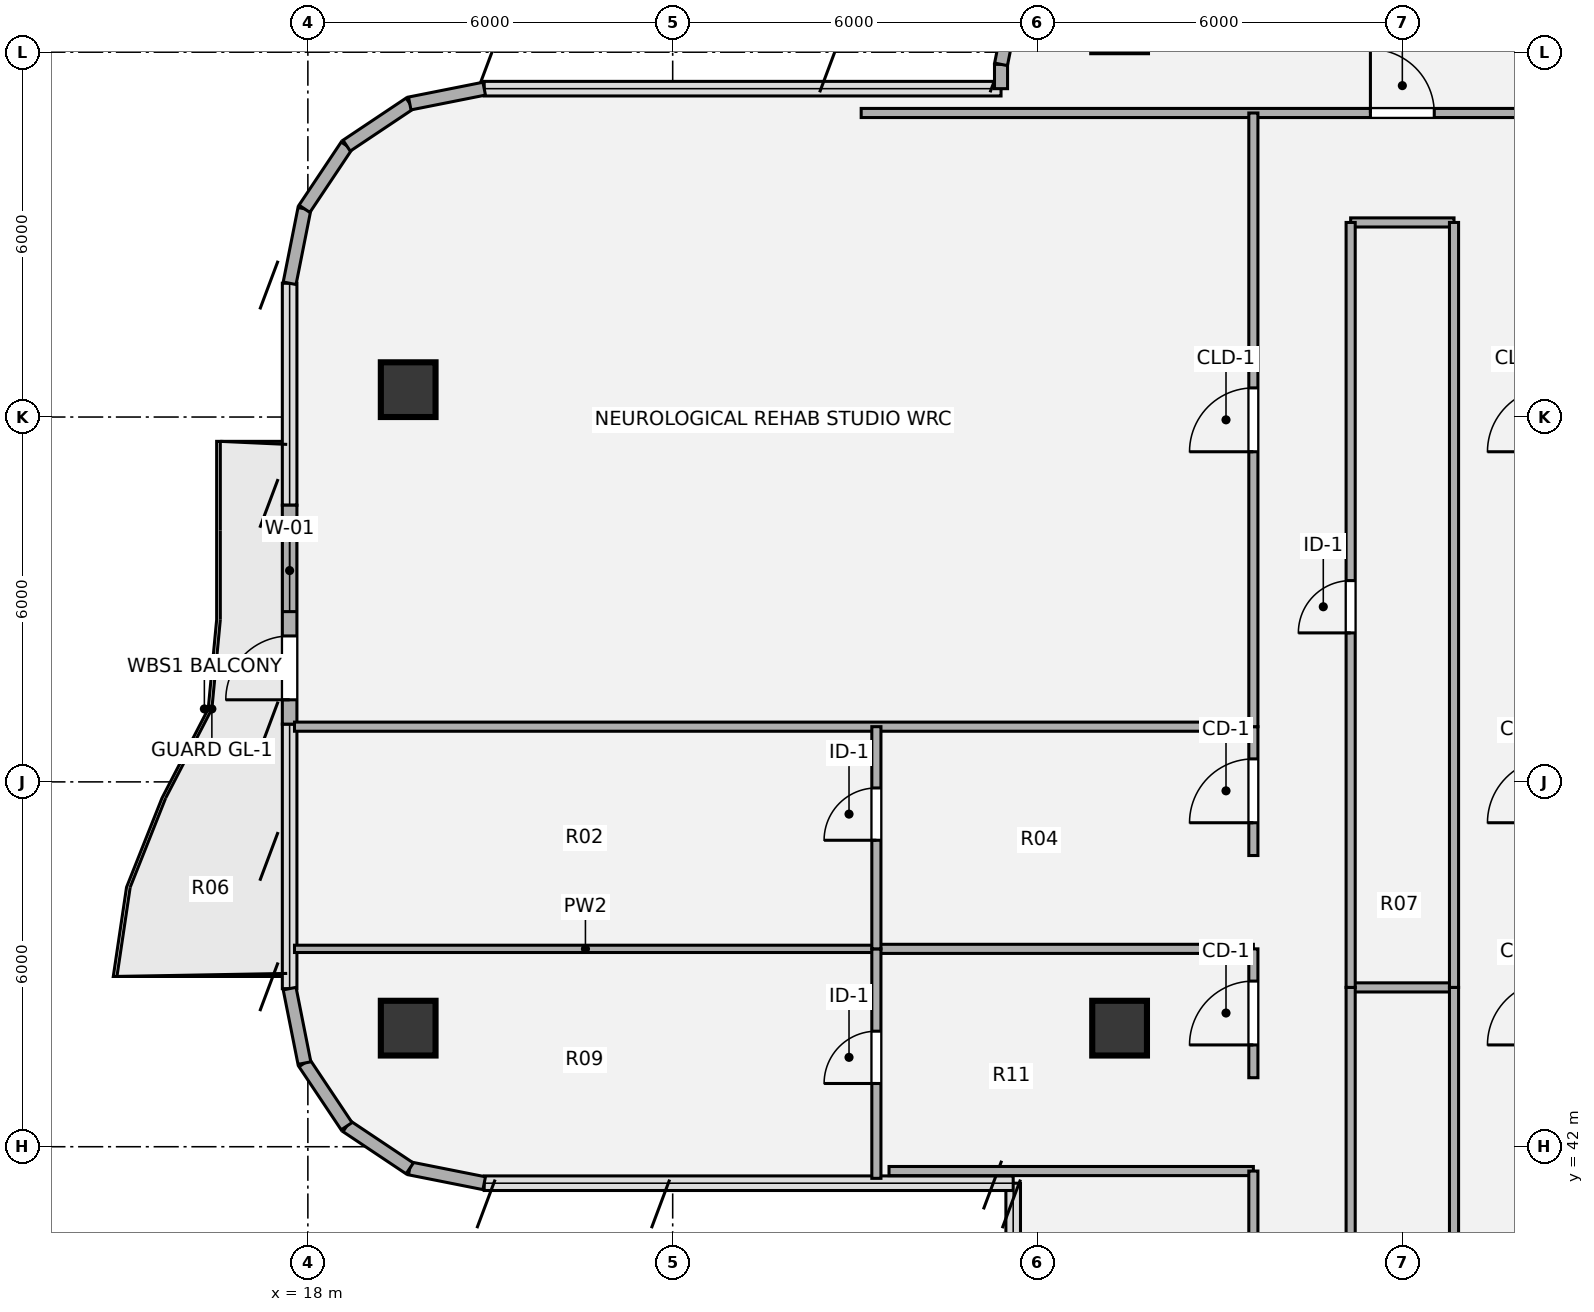
"""IFC4 building model, lengths in metres.
Left out: names, types, materials, properties, quantities, classifications, styles, units other than length and angle.
Written with IfcOpenShell. Run it as: python <this file> out.ifc"""

import sys

from ifc_helpers import new_model, si_unit, direction, frame, frame_2d, origin, origin_2d, place, context, subcontext, project, spatial, rectangle, hollow_circle, extrude, source, transform, mapped, element, fill, save


model = new_model("IFC4")
c1 = context("Model", 3, precision=1e-05, world=origin(), true_north=direction((0.0, 1.0)))
c2 = subcontext(c1, "Body", "Model", "MODEL_VIEW")
j1 = project(units=[si_unit("LENGTHUNIT", "METRE"), si_unit("PLANEANGLEUNIT", "RADIAN")], contexts=[c1])
p1 = place(None, origin())
s1 = spatial("IfcSite", under=j1, at=p1, CompositionType="ELEMENT")
p2 = place(p1, origin())
s2 = spatial("IfcBuilding", under=s1, at=p2, CompositionType="ELEMENT")
p3 = place(p2, frame((0.0, 0.0, 245.7)))
s3 = spatial("IfcBuildingStorey", under=s2, at=p3, CompositionType="ELEMENT", Elevation=245.7)
m1 = source(origin(), c2, "Body", "SweptSolid", [
    extrude(hollow_circle(Radius=0.45, WallThickness=0.032, at=origin_2d()), origin(), (0.0, 0.0, 1.0), 3.78),
])
for number, where, z_axis, x_axis in (
    (1, (19.65, 43.95, 0.0), (0.0, 0.0, 1.0), (1.0, 0.0, 0.0)),
    (2, (19.65, 54.45, 0.0), (0.0, 0.0, 1.0), (1.0, 0.0, 0.0)),
    (3, (31.35, 43.95, 0.0), (0.0, 0.0, 1.0), (1.0, 0.0, 0.0)),
):
    element("IfcColumn", number, at=place(p3, frame(where, z_axis=z_axis, x_axis=x_axis)), inside=s3, PredefinedType="COLUMN", context=c2, shape_type="MappedRepresentation", body=[
        mapped(m1, transform((0.0, 0.0, 0.0), x_axis=(1.0, 0.0, 0.0), y_axis=(0.0, 1.0, 0.0), z_axis=(0.0, 0.0, 1.0), scale=1.0)),
    ])
for number, where, z_axis, x_axis in (
    (4, (20.9, 41.4, 0.0), (0.0, 0.0, 1.0), (-0.981, 0.195, 0.0)),
    (5, (19.675, 41.644, 0.0), (0.0, 0.0, 1.0), (-0.831, 0.556, 0.0)),
    (6, (18.637, 42.337, 0.0), (0.0, 0.0, 1.0), (-0.556, 0.831, 0.0)),
    (7, (17.944, 43.375, 0.0), (0.0, 0.0, 1.0), (-0.195, 0.981, 0.0)),
):
    element("IfcWall", number, at=place(p3, frame(where, z_axis=z_axis, x_axis=x_axis)), inside=s3, PredefinedType="SOLIDWALL", context=c2, shape_type="SweptSolid", body=[
        extrude(rectangle(XDim=1.249, YDim=0.215, at=frame_2d((0.624, 0.0))), origin(), (0.0, 0.0, 1.0), 3.53),
    ])
p4 = place(p3, frame((17.7, 48.95, 0.0), z_axis=(0.0, 0.0, 1.0), x_axis=(0.0, 1.0, 0.0)))
e8 = element("IfcWall", 8, at=p4, inside=s3, PredefinedType="SOLIDWALL", context=c2, shape_type="SweptSolid", body=[
    extrude(rectangle(XDim=3.6, YDim=0.24, at=frame_2d((1.8, 0.0))), origin(), (0.0, 0.0, 1.0), 3.53),
])
p5 = place(p4, frame((0.4, 0.0, 0.0)))
e9 = element("IfcOpeningElement", 9, at=p5, cuts=e8, PredefinedType="OPENING", context=c2, shape_type="SweptSolid", body=[
    extrude(rectangle(XDim=1.05, YDim=2.15, at=origin_2d()), frame((0.525, 0.13, 1.075), z_axis=(0.0, -1.0, 0.0), x_axis=(1.0, 0.0, 0.0)), (0.0, 0.0, 1.0), 0.26),
])
p6 = place(p4, frame((1.85, 0.0, 0.85)))
e10 = element("IfcOpeningElement", 10, at=p6, cuts=e8, PredefinedType="OPENING", context=c2, shape_type="SweptSolid", body=[
    extrude(rectangle(XDim=1.35, YDim=1.35, at=origin_2d()), frame((0.675, 0.13, 0.675), z_axis=(0.0, -1.0, 0.0), x_axis=(1.0, 0.0, 0.0)), (0.0, 0.0, 1.0), 0.26),
])
for number, where, z_axis, x_axis in (
    (11, (17.7, 56.2, 0.0), (0.0, 0.0, 1.0), (0.195, 0.981, 0.0)),
    (12, (17.944, 57.425, 0.0), (0.0, 0.0, 1.0), (0.556, 0.831, 0.0)),
    (13, (18.637, 58.463, 0.0), (0.0, 0.0, 1.0), (0.831, 0.556, 0.0)),
    (14, (19.675, 59.156, 0.0), (0.0, 0.0, 1.0), (0.981, 0.195, 0.0)),
):
    element("IfcWall", number, at=place(p3, frame(where, z_axis=z_axis, x_axis=x_axis)), inside=s3, PredefinedType="SOLIDWALL", context=c2, shape_type="SweptSolid", body=[
        extrude(rectangle(XDim=1.249, YDim=0.215, at=frame_2d((0.624, 0.0))), origin(), (0.0, 0.0, 1.0), 3.53),
    ])
p7 = place(p3, frame((29.4, 59.4, 0.0), z_axis=(0.0, 0.0, 1.0), x_axis=(0.0, 1.0, 0.0)))
e15 = element("IfcWall", 15, at=p7, inside=s3, PredefinedType="SOLIDWALL", context=c2, shape_type="SweptSolid", body=[
    extrude(rectangle(XDim=0.4, YDim=0.215, at=frame_2d((0.2, 0.0))), origin(), (0.0, 0.0, 1.0), 3.53),
])
p8 = place(p3, frame((29.4, 59.8, 0.0), z_axis=(0.0, 0.0, 1.0), x_axis=(0.195190360752, 0.980765376158, 0.0)))
e16 = element("IfcWall", 16, at=p8, inside=s3, PredefinedType="SOLIDWALL", context=c2, shape_type="SweptSolid", body=[
    extrude(rectangle(XDim=1.014, YDim=0.215, at=frame_2d((0.507, 0.0))), origin(), (0.0, 0.0, 1.0), 3.53),
])
p9 = place(p3, frame((27.558, 41.6, 0.0), z_axis=(0.0, 0.0, 1.0), x_axis=(1.0, 0.0, 0.0)))
e17 = element("IfcWall", 17, at=p9, inside=s3, PredefinedType="PARTITIONING", context=c2, shape_type="SweptSolid", body=[
    extrude(rectangle(XDim=5.992, YDim=0.15, at=frame_2d((2.996, 0.0))), origin(), (0.0, 0.0, 1.0), 3.5),
])
p10 = place(p3, frame((35.15, 44.62, 0.0), z_axis=(0.0, 0.0, 1.0), x_axis=(1.0, 0.0, 0.0)))
e18 = element("IfcWall", 18, at=p10, inside=s3, PredefinedType="PARTITIONING", context=c2, shape_type="SweptSolid", body=[
    extrude(rectangle(XDim=1.7, YDim=0.15, at=frame_2d((0.85, 0.0))), origin(), (0.0, 0.0, 1.0), 3.259),
])
p11 = place(p3, frame((17.78, 45.254, 0.0), z_axis=(0.0, 0.0, 1.0), x_axis=(1.0, 0.0, 0.0)))
e19 = element("IfcWall", 19, at=p11, inside=s3, PredefinedType="PARTITIONING", context=c2, shape_type="SweptSolid", body=[
    extrude(rectangle(XDim=9.57, YDim=0.12, at=frame_2d((4.785, 0.0))), origin(), (0.0, 0.0, 1.0), 2.982),
])
p12 = place(p3, frame((27.35, 45.254, 0.0), z_axis=(0.0, 0.0, 1.0), x_axis=(1.0, 0.0, 0.0)))
e20 = element("IfcWall", 20, at=p12, inside=s3, PredefinedType="PARTITIONING", context=c2, shape_type="SweptSolid", body=[
    extrude(rectangle(XDim=6.2, YDim=0.15, at=frame_2d((3.1, 0.0))), origin(), (0.0, 0.0, 1.0), 2.982),
])
p13 = place(p3, frame((17.78, 48.908, 0.0), z_axis=(0.0, 0.0, 1.0), x_axis=(1.0, 0.0, 0.0)))
e21 = element("IfcWall", 21, at=p13, inside=s3, PredefinedType="PARTITIONING", context=c2, shape_type="SweptSolid", body=[
    extrude(rectangle(XDim=15.77, YDim=0.15, at=frame_2d((7.885, 0.0))), origin(), (0.0, 0.0, 1.0), 2.982),
])
p14 = place(p3, frame((35.15, 57.2, 0.0), z_axis=(0.0, 0.0, 1.0), x_axis=(1.0, 0.0, 0.0)))
e22 = element("IfcWall", 22, at=p14, inside=s3, PredefinedType="PARTITIONING", context=c2, shape_type="SweptSolid", body=[
    extrude(rectangle(XDim=1.7, YDim=0.15, at=frame_2d((0.85, 0.0))), origin(), (0.0, 0.0, 1.0), 3.308),
])
p15 = place(p3, frame((27.1, 59.0, 0.0), z_axis=(0.0, 0.0, 1.0), x_axis=(1.0, 0.0, 0.0)))
e23 = element("IfcWall", 23, at=p15, inside=s3, PredefinedType="PARTITIONING", context=c2, shape_type="SweptSolid", body=[
    extrude(rectangle(XDim=17.8, YDim=0.15, at=frame_2d((8.9, 0.0))), origin(), (0.0, 0.0, 1.0), 3.308),
])
p16 = place(p15, frame((8.375, 0.0, 0.0)))
e24 = element("IfcOpeningElement", 24, at=p16, cuts=e23, PredefinedType="OPENING", context=c2, shape_type="SweptSolid", body=[
    extrude(rectangle(XDim=1.05, YDim=2.1, at=origin_2d()), frame((0.525, 0.085, 1.05), z_axis=(0.0, -1.0, 0.0), x_axis=(1.0, 0.0, 0.0)), (0.0, 0.0, 1.0), 0.17),
])
p17 = place(p3, frame((27.35, 41.48, 0.0), z_axis=(0.0, 0.0, 1.0), x_axis=(0.0, 1.0, 0.0)))
e25 = element("IfcWall", 25, at=p17, inside=s3, PredefinedType="PARTITIONING", context=c2, shape_type="SweptSolid", body=[
    extrude(rectangle(XDim=3.774, YDim=0.15, at=frame_2d((1.887, 0.0))), origin(), (0.0, 0.0, 1.0), 3.5),
])
p18 = place(p17, frame((1.56, 0.0, 0.0)))
e26 = element("IfcOpeningElement", 26, at=p18, cuts=e25, PredefinedType="OPENING", context=c2, shape_type="SweptSolid", body=[
    extrude(rectangle(XDim=0.86, YDim=2.1, at=origin_2d()), frame((0.43, 0.085, 1.05), z_axis=(0.0, -1.0, 0.0), x_axis=(1.0, 0.0, 0.0)), (0.0, 0.0, 1.0), 0.17),
])
p19 = place(p3, frame((27.35, 45.254, 0.0), z_axis=(0.0, 0.0, 1.0), x_axis=(0.0, 1.0, 0.0)))
e27 = element("IfcWall", 27, at=p19, inside=s3, PredefinedType="PARTITIONING", context=c2, shape_type="SweptSolid", body=[
    extrude(rectangle(XDim=3.654, YDim=0.15, at=frame_2d((1.827, 0.0))), origin(), (0.0, 0.0, 1.0), 3.5),
])
p20 = place(p19, frame((1.786, 0.0, 0.0)))
e28 = element("IfcOpeningElement", 28, at=p20, cuts=e27, PredefinedType="OPENING", context=c2, shape_type="SweptSolid", body=[
    extrude(rectangle(XDim=0.86, YDim=2.1, at=origin_2d()), frame((0.43, 0.085, 1.05), z_axis=(0.0, -1.0, 0.0), x_axis=(1.0, 0.0, 0.0)), (0.0, 0.0, 1.0), 0.17),
])
p21 = place(p3, frame((33.55, 21.2, 0.0), z_axis=(0.0, 0.0, 1.0), x_axis=(0.0, 1.0, 0.0)))
e29 = element("IfcWall", 29, at=p21, inside=s3, PredefinedType="PARTITIONING", context=c2, shape_type="SweptSolid", body=[
    extrude(rectangle(XDim=20.4, YDim=0.15, at=frame_2d((10.2, 0.0))), origin(), (0.0, 0.0, 1.0), 3.5),
])
p22 = place(p21, frame((9.64, 0.0, 0.0)))
e30 = element("IfcOpeningElement", 30, at=p22, cuts=e29, PredefinedType="OPENING", context=c2, shape_type="SweptSolid", body=[
    extrude(rectangle(XDim=0.86, YDim=2.1, at=origin_2d()), frame((0.43, 0.085, 1.05), z_axis=(0.0, -1.0, 0.0), x_axis=(1.0, 0.0, 0.0)), (0.0, 0.0, 1.0), 0.17),
])
p23 = place(p3, frame((33.55, 43.135, 0.0), z_axis=(0.0, 0.0, 1.0), x_axis=(0.0, 1.0, 0.0)))
e31 = element("IfcWall", 31, at=p23, inside=s3, PredefinedType="PARTITIONING", context=c2, shape_type="SweptSolid", body=[
    extrude(rectangle(XDim=2.119, YDim=0.15, at=frame_2d((1.06, 0.0))), origin(), (0.0, 0.0, 1.0), 3.5),
])
p24 = place(p23, frame((0.539, 0.0, 0.0)))
e32 = element("IfcOpeningElement", 32, at=p24, cuts=e31, PredefinedType="OPENING", context=c2, shape_type="SweptSolid", body=[
    extrude(rectangle(XDim=1.05, YDim=2.1, at=origin_2d()), frame((0.525, 0.085, 1.05), z_axis=(0.0, -1.0, 0.0), x_axis=(1.0, 0.0, 0.0)), (0.0, 0.0, 1.0), 0.17),
])
p25 = place(p3, frame((33.55, 46.789, 0.0), z_axis=(0.0, 0.0, 1.0), x_axis=(0.0, 1.0, 0.0)))
e33 = element("IfcWall", 33, at=p25, inside=s3, PredefinedType="PARTITIONING", context=c2, shape_type="SweptSolid", body=[
    extrude(rectangle(XDim=2.119, YDim=0.15, at=frame_2d((1.06, 0.0))), origin(), (0.0, 0.0, 1.0), 3.5),
])
p26 = place(p25, frame((0.539, 0.0, 0.0)))
e34 = element("IfcOpeningElement", 34, at=p26, cuts=e33, PredefinedType="OPENING", context=c2, shape_type="SweptSolid", body=[
    extrude(rectangle(XDim=1.05, YDim=2.1, at=origin_2d()), frame((0.525, 0.085, 1.05), z_axis=(0.0, -1.0, 0.0), x_axis=(1.0, 0.0, 0.0)), (0.0, 0.0, 1.0), 0.17),
])
p27 = place(p3, frame((33.55, 48.908, 0.0), z_axis=(0.0, 0.0, 1.0), x_axis=(0.0, 1.0, 0.0)))
e35 = element("IfcWall", 35, at=p27, inside=s3, PredefinedType="PARTITIONING", context=c2, shape_type="SweptSolid", body=[
    extrude(rectangle(XDim=10.092, YDim=0.15, at=frame_2d((5.046, 0.0))), origin(), (0.0, 0.0, 1.0), 3.5),
])
p28 = place(p27, frame((4.521, 0.0, 0.0)))
e36 = element("IfcOpeningElement", 36, at=p28, cuts=e35, PredefinedType="OPENING", context=c2, shape_type="SweptSolid", body=[
    extrude(rectangle(XDim=1.05, YDim=2.1, at=origin_2d()), frame((0.525, 0.085, 1.05), z_axis=(0.0, -1.0, 0.0), x_axis=(1.0, 0.0, 0.0)), (0.0, 0.0, 1.0), 0.17),
])
p29 = place(p3, frame((35.15, 25.2, 0.0), z_axis=(0.0, 0.0, 1.0), x_axis=(0.0, 1.0, 0.0)))
e37 = element("IfcWall", 37, at=p29, inside=s3, PredefinedType="PARTITIONING", context=c2, shape_type="SweptSolid", body=[
    extrude(rectangle(XDim=19.42, YDim=0.15, at=frame_2d((9.71, 0.0))), origin(), (0.0, 0.0, 1.0), 3.5),
])
p30 = place(p3, frame((35.15, 44.62, 0.0), z_axis=(0.0, 0.0, 1.0), x_axis=(0.0, 1.0, 0.0)))
e38 = element("IfcWall", 38, at=p30, inside=s3, PredefinedType="PARTITIONING", context=c2, shape_type="SweptSolid", body=[
    extrude(rectangle(XDim=12.58, YDim=0.15, at=frame_2d((6.29, 0.0))), origin(), (0.0, 0.0, 1.0), 3.5),
])
p31 = place(p30, frame((5.83, 0.0, 0.0)))
e39 = element("IfcOpeningElement", 39, at=p31, cuts=e38, PredefinedType="OPENING", context=c2, shape_type="SweptSolid", body=[
    extrude(rectangle(XDim=0.86, YDim=2.1, at=origin_2d()), frame((0.43, 0.085, 1.05), z_axis=(0.0, -1.0, 0.0), x_axis=(1.0, 0.0, 0.0)), (0.0, 0.0, 1.0), 0.17),
])
p32 = place(p3, frame((36.85, 25.2, 0.0), z_axis=(0.0, 0.0, 1.0), x_axis=(0.0, 1.0, 0.0)))
e40 = element("IfcWall", 40, at=p32, inside=s3, PredefinedType="PARTITIONING", context=c2, shape_type="SweptSolid", body=[
    extrude(rectangle(XDim=19.42, YDim=0.15, at=frame_2d((9.71, 0.0))), origin(), (0.0, 0.0, 1.0), 3.5),
])
p33 = place(p32, frame((9.185, 0.0, 0.0)))
e41 = element("IfcOpeningElement", 41, at=p33, cuts=e40, PredefinedType="OPENING", context=c2, shape_type="SweptSolid", body=[
    extrude(rectangle(XDim=1.05, YDim=2.1, at=origin_2d()), frame((0.525, 0.085, 1.05), z_axis=(0.0, -1.0, 0.0), x_axis=(1.0, 0.0, 0.0)), (0.0, 0.0, 1.0), 0.17),
])
p34 = place(p3, frame((36.85, 44.62, 0.0), z_axis=(0.0, 0.0, 1.0), x_axis=(0.0, 1.0, 0.0)))
e42 = element("IfcWall", 42, at=p34, inside=s3, PredefinedType="PARTITIONING", context=c2, shape_type="SweptSolid", body=[
    extrude(rectangle(XDim=12.58, YDim=0.15, at=frame_2d((6.29, 0.0))), origin(), (0.0, 0.0, 1.0), 3.5),
])
m2 = source(origin(), c2, "Body", "SweptSolid", [
    extrude(rectangle(XDim=1.05, YDim=2.15, at=origin_2d()), frame((0.525, 0.025, 1.075), z_axis=(0.0, -1.0, 0.0), x_axis=(1.0, 0.0, 0.0)), (0.0, 0.0, 1.0), 0.05),
])
p35 = place(p5, origin())
e43 = element("IfcDoor", 43, at=p35, inside=s3, OperationType="SINGLE_SWING_LEFT", PredefinedType="DOOR", context=c2, shape_type="MappedRepresentation", body=[
    mapped(m2, transform((0.0, 0.0, 0.0), x_axis=(1.0, 0.0, 0.0), y_axis=(0.0, 1.0, 0.0), z_axis=(0.0, 0.0, 1.0), scale=1.0)),
])
fill(e9, e43)
m3 = source(origin(), c2, "Body", "SweptSolid", [
    extrude(rectangle(XDim=1.35, YDim=1.35, at=origin_2d()), frame((0.675, 0.03, 0.675), z_axis=(0.0, -1.0, 0.0), x_axis=(1.0, 0.0, 0.0)), (0.0, 0.0, 1.0), 0.06),
])
p36 = place(p6, origin())
e44 = element("IfcWindow", 44, at=p36, inside=s3, PartitioningType="SINGLE_PANEL", PredefinedType="WINDOW", context=c2, shape_type="MappedRepresentation", body=[
    mapped(m3, transform((0.0, 0.0, 0.0), x_axis=(1.0, 0.0, 0.0), y_axis=(0.0, 1.0, 0.0), z_axis=(0.0, 0.0, 1.0), scale=1.0)),
])
fill(e10, e44)
m4 = source(origin(), c2, "Body", "SweptSolid", [
    extrude(rectangle(XDim=1.05, YDim=2.1, at=origin_2d()), frame((0.525, 0.025, 1.05), z_axis=(0.0, -1.0, 0.0), x_axis=(1.0, 0.0, 0.0)), (0.0, 0.0, 1.0), 0.05),
])
p37 = place(p16, origin())
e45 = element("IfcDoor", 45, at=p37, inside=s3, OperationType="SINGLE_SWING_LEFT", PredefinedType="DOOR", context=c2, shape_type="MappedRepresentation", body=[
    mapped(m4, transform((0.0, 0.0, 0.0), x_axis=(1.0, 0.0, 0.0), y_axis=(0.0, 1.0, 0.0), z_axis=(0.0, 0.0, 1.0), scale=1.0)),
])
fill(e24, e45)
m5 = source(origin(), c2, "Body", "SweptSolid", [
    extrude(rectangle(XDim=0.86, YDim=2.1, at=origin_2d()), frame((0.43, 0.025, 1.05), z_axis=(0.0, -1.0, 0.0), x_axis=(1.0, 0.0, 0.0)), (0.0, 0.0, 1.0), 0.05),
])
p38 = place(p18, origin())
e46 = element("IfcDoor", 46, at=p38, inside=s3, OperationType="SINGLE_SWING_LEFT", PredefinedType="DOOR", context=c2, shape_type="MappedRepresentation", body=[
    mapped(m5, transform((0.0, 0.0, 0.0), x_axis=(1.0, 0.0, 0.0), y_axis=(0.0, 1.0, 0.0), z_axis=(0.0, 0.0, 1.0), scale=1.0)),
])
fill(e26, e46)
p39 = place(p20, origin())
e47 = element("IfcDoor", 47, at=p39, inside=s3, OperationType="SINGLE_SWING_LEFT", PredefinedType="DOOR", context=c2, shape_type="MappedRepresentation", body=[
    mapped(m5, transform((0.0, 0.0, 0.0), x_axis=(1.0, 0.0, 0.0), y_axis=(0.0, 1.0, 0.0), z_axis=(0.0, 0.0, 1.0), scale=1.0)),
])
fill(e28, e47)
m6 = source(origin(), c2, "Body", "SweptSolid", [
    extrude(rectangle(XDim=1.05, YDim=2.1, at=origin_2d()), frame((0.525, 0.025, 1.05), z_axis=(0.0, -1.0, 0.0), x_axis=(1.0, 0.0, 0.0)), (0.0, 0.0, 1.0), 0.05),
])
p40 = place(p24, origin())
e48 = element("IfcDoor", 48, at=p40, inside=s3, OperationType="SINGLE_SWING_LEFT", PredefinedType="DOOR", context=c2, shape_type="MappedRepresentation", body=[
    mapped(m6, transform((0.0, 0.0, 0.0), x_axis=(1.0, 0.0, 0.0), y_axis=(0.0, 1.0, 0.0), z_axis=(0.0, 0.0, 1.0), scale=1.0)),
])
fill(e32, e48)
p41 = place(p26, origin())
e49 = element("IfcDoor", 49, at=p41, inside=s3, OperationType="SINGLE_SWING_LEFT", PredefinedType="DOOR", context=c2, shape_type="MappedRepresentation", body=[
    mapped(m6, transform((0.0, 0.0, 0.0), x_axis=(1.0, 0.0, 0.0), y_axis=(0.0, 1.0, 0.0), z_axis=(0.0, 0.0, 1.0), scale=1.0)),
])
fill(e34, e49)
p42 = place(p28, origin())
e50 = element("IfcDoor", 50, at=p42, inside=s3, OperationType="SINGLE_SWING_LEFT", PredefinedType="DOOR", context=c2, shape_type="MappedRepresentation", body=[
    mapped(m4, transform((0.0, 0.0, 0.0), x_axis=(1.0, 0.0, 0.0), y_axis=(0.0, 1.0, 0.0), z_axis=(0.0, 0.0, 1.0), scale=1.0)),
])
fill(e36, e50)
p43 = place(p31, origin())
e51 = element("IfcDoor", 51, at=p43, inside=s3, OperationType="SINGLE_SWING_LEFT", PredefinedType="DOOR", context=c2, shape_type="MappedRepresentation", body=[
    mapped(m5, transform((0.0, 0.0, 0.0), x_axis=(1.0, 0.0, 0.0), y_axis=(0.0, 1.0, 0.0), z_axis=(0.0, 0.0, 1.0), scale=1.0)),
])
fill(e39, e51)
save(model, sys.argv[1])
